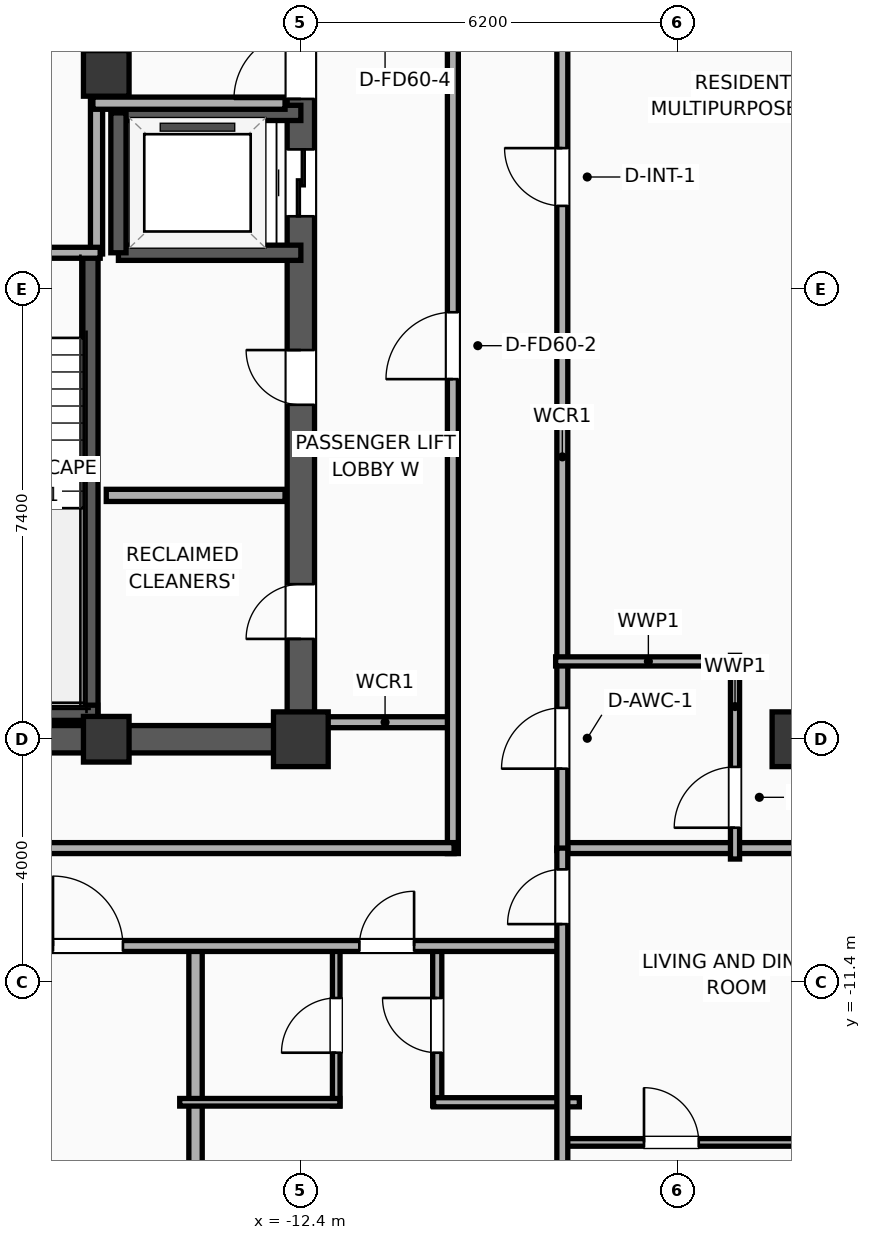
"""IFC4 building model, lengths in metres.
Left out: names, types, materials, properties, quantities, classifications, styles, units other than length and angle.
Written with IfcOpenShell. Run it as: python <this file> out.ifc"""

import sys

from ifc_helpers import new_model, si_unit, direction, frame, frame_2d, origin, origin_2d, place, context, subcontext, project, spatial, rectangle, extrude, element, fill, save


model = new_model("IFC4")
c1 = context("Model", 3, precision=1e-05, world=origin(), true_north=direction((0.0, 1.0)))
c2 = subcontext(c1, "Body", "Model", "MODEL_VIEW")
j1 = project(units=[si_unit("LENGTHUNIT", "METRE"), si_unit("PLANEANGLEUNIT", "RADIAN")], contexts=[c1])
p1 = place(None, origin())
s1 = spatial("IfcSite", under=j1, at=p1, CompositionType="ELEMENT")
p2 = place(p1, origin())
s2 = spatial("IfcBuilding", under=s1, at=p2, CompositionType="ELEMENT")
p3 = place(p2, frame((0.0, 0.0, 215.8)))
s3 = spatial("IfcBuildingStorey", under=s2, at=p3, CompositionType="ELEMENT", Elevation=215.8)
p4 = place(p3, frame((-15.6, -7.4, 0.0), z_axis=(0.0, 0.0, 1.0), x_axis=(1.0, 0.0, 0.0)))
e1 = element("IfcColumn", 1, at=p4, inside=s3, PredefinedType="COLUMN", context=c2, shape_type="SweptSolid", body=[
    extrude(rectangle(XDim=0.75, YDim=0.75, at=origin_2d()), origin(), (0.0, 0.0, 1.0), 3.9),
])
p5 = place(p3, frame((-12.4, -7.4, 0.0), z_axis=(0.0, 0.0, 1.0), x_axis=(1.0, 0.0, 0.0)))
e2 = element("IfcColumn", 2, at=p5, inside=s3, PredefinedType="COLUMN", context=c2, shape_type="SweptSolid", body=[
    extrude(rectangle(XDim=0.9, YDim=0.9, at=origin_2d()), origin(), (0.0, 0.0, 1.0), 3.9),
])
p6 = place(p3, frame((-15.6, 3.55, 0.0), z_axis=(0.0, 0.0, 1.0), x_axis=(1.0, 0.0, 0.0)))
e3 = element("IfcColumn", 3, at=p6, inside=s3, PredefinedType="COLUMN", context=c2, shape_type="SweptSolid", body=[
    extrude(rectangle(XDim=0.75, YDim=0.75, at=origin_2d()), origin(), (0.0, 0.0, 1.0), 3.9),
])
p7 = place(p3, frame((-19.425, -7.4, 0.0), z_axis=(0.0, 0.0, 1.0), x_axis=(1.0, 0.0, 0.0)))
e4 = element("IfcWall", 4, at=p7, inside=s3, PredefinedType="SHEAR", context=c2, shape_type="SweptSolid", body=[
    extrude(rectangle(XDim=7.25, YDim=0.45, at=frame_2d((3.625, 0.0))), origin(), (0.0, 0.0, 1.0), 3.65),
])
p8 = place(p3, frame((-12.4, -7.4, 0.0), z_axis=(0.0, 0.0, 1.0), x_axis=(0.0, 1.0, 0.0)))
e5 = element("IfcWall", 5, at=p8, inside=s3, PredefinedType="SHEAR", context=c2, shape_type="SweptSolid", body=[
    extrude(rectangle(XDim=14.8, YDim=0.45, at=frame_2d((7.4, 0.0))), origin(), (0.0, 0.0, 1.0), 3.65),
])
p9 = place(p8, frame((8.6, 0.0, 0.0)))
e6 = element("IfcOpeningElement", 6, at=p9, cuts=e5, PredefinedType="OPENING", context=c2, shape_type="SweptSolid", body=[
    extrude(rectangle(XDim=1.1, YDim=2.05, at=frame_2d((0.55, 1.025))), frame((0.0, 0.235, 0.0), z_axis=(0.0, -1.0, 0.0), x_axis=(1.0, 0.0, 0.0)), (0.0, 0.0, 1.0), 0.47),
])
p10 = place(p8, frame((10.53, 0.0, 0.0)))
e7 = element("IfcOpeningElement", 7, at=p10, cuts=e5, PredefinedType="OPENING", context=c2, shape_type="SweptSolid", body=[
    extrude(rectangle(XDim=1.1, YDim=2.05, at=frame_2d((0.55, 1.025))), frame((0.0, 0.235, 0.0), z_axis=(0.0, -1.0, 0.0), x_axis=(1.0, 0.0, 0.0)), (0.0, 0.0, 1.0), 0.47),
])
p11 = place(p8, frame((1.65, 0.0, 0.0)))
e8 = element("IfcOpeningElement", 8, at=p11, cuts=e5, PredefinedType="OPENING", context=c2, shape_type="SweptSolid", body=[
    extrude(rectangle(XDim=0.9, YDim=2.05, at=frame_2d((0.45, 1.025))), frame((0.0, 0.235, 0.0), z_axis=(0.0, -1.0, 0.0), x_axis=(1.0, 0.0, 0.0)), (0.0, 0.0, 1.0), 0.47),
])
p12 = place(p8, frame((5.5, 0.0, 0.0)))
e9 = element("IfcOpeningElement", 9, at=p12, cuts=e5, PredefinedType="OPENING", context=c2, shape_type="SweptSolid", body=[
    extrude(rectangle(XDim=0.9, YDim=2.05, at=frame_2d((0.45, 1.025))), frame((0.0, 0.235, 0.0), z_axis=(0.0, -1.0, 0.0), x_axis=(1.0, 0.0, 0.0)), (0.0, 0.0, 1.0), 0.47),
])
p13 = place(p3, frame((-15.86, -7.085, 0.0), z_axis=(0.0, 0.0, 1.0), x_axis=(0.0, 1.0, 0.0)))
e10 = element("IfcWall", 10, at=p13, inside=s3, PredefinedType="SOLIDWALL", context=c2, shape_type="SweptSolid", body=[
    extrude(rectangle(XDim=7.685, YDim=0.25, at=frame_2d((3.843, 0.0))), origin(), (0.0, 0.0, 1.0), 3.65),
])
p14 = place(p3, frame((-19.2, -6.965, 0.0), z_axis=(0.0, 0.0, 1.0), x_axis=(1.0, 0.0, 0.0)))
e11 = element("IfcWall", 11, at=p14, inside=s3, PredefinedType="SOLIDWALL", context=c2, shape_type="SweptSolid", body=[
    extrude(rectangle(XDim=3.46, YDim=0.25, at=frame_2d((1.73, 0.0))), origin(), (0.0, 0.0, 1.0), 3.65),
])
p15 = place(p3, frame((-4.2, -7.4, 0.0), z_axis=(0.0, 0.0, 1.0), x_axis=(1.0, 0.0, 0.0)))
e12 = element("IfcColumn", 12, at=p15, inside=s3, PredefinedType="COLUMN", context=c2, shape_type="SweptSolid", body=[
    extrude(rectangle(XDim=0.9, YDim=0.9, at=origin_2d()), origin(), (0.0, 0.0, 1.0), 3.9),
])
for number, where, z_axis, x_axis in (
    (13, (-15.4, 0.6, 0.0), (0.0, 0.0, 1.0), (1.0, 0.0, 0.0)),
    (14, (-12.4, 2.9, 0.0), (0.0, 0.0, 1.0), (-1.0, 0.0, 0.0)),
):
    element("IfcWall", number, at=place(p3, frame(where, z_axis=z_axis, x_axis=x_axis)), inside=s3, PredefinedType="SOLIDWALL", context=c2, shape_type="SweptSolid", body=[
        extrude(rectangle(XDim=3.0, YDim=0.25, at=frame_2d((1.5, 0.0))), origin(), (0.0, 0.0, 1.0), 3.65),
    ])
p16 = place(p3, frame((-15.4, 2.9, 0.0), z_axis=(0.0, 0.0, 1.0), x_axis=(0.0, -1.0, 0.0)))
e15 = element("IfcWall", 15, at=p16, inside=s3, PredefinedType="SOLIDWALL", context=c2, shape_type="SweptSolid", body=[
    extrude(rectangle(XDim=2.3, YDim=0.25, at=frame_2d((1.15, 0.0))), origin(), (0.0, 0.0, 1.0), 3.65),
])
p17 = place(p3, frame((-15.76, 0.58, 0.0), z_axis=(0.0, 0.0, 1.0), x_axis=(0.0, 1.0, 0.0)))
e16 = element("IfcWall", 16, at=p17, inside=s3, PredefinedType="PARTITIONING", context=c2, shape_type="SweptSolid", body=[
    extrude(rectangle(XDim=2.52, YDim=0.2, at=frame_2d((1.26, 0.0))), origin(), (0.0, 0.0, 1.0), 3.65),
])
p18 = place(p3, frame((-15.82, 3.06, 0.0), z_axis=(0.0, 0.0, 1.0), x_axis=(1.0, 0.0, 0.0)))
e17 = element("IfcWall", 17, at=p18, inside=s3, PredefinedType="PARTITIONING", context=c2, shape_type="SweptSolid", body=[
    extrude(rectangle(XDim=3.16, YDim=0.2, at=frame_2d((1.58, 0.0))), origin(), (0.0, 0.0, 1.0), 3.65),
])
p19 = place(p3, frame((-19.06, 0.6, 0.0), z_axis=(0.0, 0.0, 1.0), x_axis=(1.0, 0.0, 0.0)))
e18 = element("IfcWall", 18, at=p19, inside=s3, PredefinedType="PARTITIONING", context=c2, shape_type="SweptSolid", body=[
    extrude(rectangle(XDim=3.36, YDim=0.18, at=frame_2d((1.68, 0.0))), origin(), (0.0, 0.0, 1.0), 3.65),
])
p20 = place(p19, frame((1.155, 0.0, 0.0)))
e19 = element("IfcOpeningElement", 19, at=p20, cuts=e18, PredefinedType="OPENING", context=c2, shape_type="SweptSolid", body=[
    extrude(rectangle(XDim=1.05, YDim=2.05, at=frame_2d((0.525, 1.025))), frame((0.0, 0.1, 0.0), z_axis=(0.0, -1.0, 0.0), x_axis=(1.0, 0.0, 0.0)), (0.0, 0.0, 1.0), 0.2),
])
p21 = place(p3, frame((-15.6, -3.39, 0.0), z_axis=(0.0, 0.0, 1.0), x_axis=(1.0, 0.0, 0.0)))
e20 = element("IfcWall", 20, at=p21, inside=s3, PredefinedType="PARTITIONING", context=c2, shape_type="SweptSolid", body=[
    extrude(rectangle(XDim=2.94, YDim=0.2, at=frame_2d((1.47, 0.0))), origin(), (0.0, 0.0, 1.0), 3.65),
])
p22 = place(p3, frame((-12.15, -7.12, 0.0), z_axis=(0.0, 0.0, 1.0), x_axis=(1.0, 0.0, 0.0)))
e21 = element("IfcWall", 21, at=p22, inside=s3, PredefinedType="PARTITIONING", context=c2, shape_type="SweptSolid", body=[
    extrude(rectangle(XDim=2.27, YDim=0.18, at=frame_2d((1.135, 0.0))), origin(), (0.0, 0.0, 1.0), 3.65),
])
p23 = place(p3, frame((-9.9, -9.28, 0.0), z_axis=(0.0, 0.0, 1.0), x_axis=(0.0, 1.0, 0.0)))
e22 = element("IfcWall", 22, at=p23, inside=s3, PredefinedType="PARTITIONING", context=c2, shape_type="SweptSolid", body=[
    extrude(rectangle(XDim=18.56, YDim=0.18, at=frame_2d((9.28, 0.0))), origin(), (0.0, 0.0, 1.0), 3.65),
])
p24 = place(p23, frame((7.802, 0.0, 0.0)))
e23 = element("IfcOpeningElement", 23, at=p24, cuts=e22, PredefinedType="OPENING", context=c2, shape_type="SweptSolid", body=[
    extrude(rectangle(XDim=1.1, YDim=2.05, at=frame_2d((0.55, 1.025))), frame((0.0, 0.1, 0.0), z_axis=(0.0, -1.0, 0.0), x_axis=(1.0, 0.0, 0.0)), (0.0, 0.0, 1.0), 0.2),
])
p25 = place(p3, frame((-26.23, -9.19, 0.0), z_axis=(0.0, 0.0, 1.0), x_axis=(1.0, 0.0, 0.0)))
e24 = element("IfcWall", 24, at=p25, inside=s3, PredefinedType="PARTITIONING", context=c2, shape_type="SweptSolid", body=[
    extrude(rectangle(XDim=16.35, YDim=0.18, at=frame_2d((8.175, 0.0))), origin(), (0.0, 0.0, 1.0), 3.65),
])
p26 = place(p3, frame((-8.15, -9.19, 0.0), z_axis=(0.0, 0.0, 1.0), x_axis=(1.0, 0.0, 0.0)))
e25 = element("IfcWall", 25, at=p26, inside=s3, PredefinedType="PARTITIONING", context=c2, shape_type="SweptSolid", body=[
    extrude(rectangle(XDim=16.3, YDim=0.18, at=frame_2d((8.15, 0.0))), origin(), (0.0, 0.0, 1.0), 3.65),
])
p27 = place(p3, frame((-8.1, -9.23, 0.0), z_axis=(0.0, 0.0, 1.0), x_axis=(0.0, 1.0, 0.0)))
e26 = element("IfcWall", 26, at=p27, inside=s3, PredefinedType="PARTITIONING", context=c2, shape_type="SweptSolid", body=[
    extrude(rectangle(XDim=18.46, YDim=0.18, at=frame_2d((9.23, 0.0))), origin(), (0.0, 0.0, 1.0), 3.65),
])
p28 = place(p27, frame((1.346, 0.0, 0.0)))
e27 = element("IfcOpeningElement", 27, at=p28, cuts=e26, PredefinedType="OPENING", context=c2, shape_type="SweptSolid", body=[
    extrude(rectangle(XDim=1.0, YDim=2.05, at=frame_2d((0.5, 1.025))), frame((0.0, 0.1, 0.0), z_axis=(0.0, -1.0, 0.0), x_axis=(1.0, 0.0, 0.0)), (0.0, 0.0, 1.0), 0.2),
])
p29 = place(p27, frame((10.601, 0.0, 0.0)))
e28 = element("IfcOpeningElement", 28, at=p29, cuts=e26, PredefinedType="OPENING", context=c2, shape_type="SweptSolid", body=[
    extrude(rectangle(XDim=0.95, YDim=2.05, at=frame_2d((0.475, 1.025))), frame((0.0, 0.1, 0.0), z_axis=(0.0, -1.0, 0.0), x_axis=(1.0, 0.0, 0.0)), (0.0, 0.0, 1.0), 0.2),
])
p30 = place(p3, frame((-5.26, -9.37, 0.0), z_axis=(0.0, 0.0, 1.0), x_axis=(0.0, 1.0, 0.0)))
e29 = element("IfcWall", 29, at=p30, inside=s3, PredefinedType="PLUMBINGWALL", context=c2, shape_type="SweptSolid", body=[
    extrude(rectangle(XDim=3.35, YDim=0.15, at=frame_2d((1.675, 0.0))), origin(), (0.0, 0.0, 1.0), 3.65),
])
p31 = place(p30, frame((0.515, 0.0, 0.0)))
e30 = element("IfcOpeningElement", 30, at=p31, cuts=e29, PredefinedType="OPENING", context=c2, shape_type="SweptSolid", body=[
    extrude(rectangle(XDim=1.0, YDim=2.05, at=frame_2d((0.5, 1.025))), frame((0.0, 0.085, 0.0), z_axis=(0.0, -1.0, 0.0), x_axis=(1.0, 0.0, 0.0)), (0.0, 0.0, 1.0), 0.17),
])
p32 = place(p3, frame((-8.21, -6.12, 0.0), z_axis=(0.0, 0.0, 1.0), x_axis=(1.0, 0.0, 0.0)))
e31 = element("IfcWall", 31, at=p32, inside=s3, PredefinedType="PLUMBINGWALL", context=c2, shape_type="SweptSolid", body=[
    extrude(rectangle(XDim=3.05, YDim=0.15, at=frame_2d((1.525, 0.0))), origin(), (0.0, 0.0, 1.0), 3.65),
])
p33 = place(p3, frame((-14.132, -18.83, 0.0), z_axis=(0.0, 0.0, 1.0), x_axis=(0.0, 1.0, 0.0)))
e32 = element("IfcWall", 32, at=p33, inside=s3, PredefinedType="PARTITIONING", context=c2, shape_type="SweptSolid", body=[
    extrude(rectangle(XDim=8.11, YDim=0.22, at=frame_2d((4.055, 0.0))), origin(), (0.0, 0.0, 1.0), 3.65),
])
p34 = place(p3, frame((-11.818, -13.43, 0.0), z_axis=(0.0, 0.0, 1.0), x_axis=(0.0, 1.0, 0.0)))
e33 = element("IfcWall", 33, at=p34, inside=s3, PredefinedType="PARTITIONING", context=c2, shape_type="SweptSolid", body=[
    extrude(rectangle(XDim=2.65, YDim=0.125, at=frame_2d((1.325, 0.0))), origin(), (0.0, 0.0, 1.0), 3.65),
])
p35 = place(p34, frame((0.875, 0.0, 0.0)))
e34 = element("IfcOpeningElement", 34, at=p35, cuts=e33, PredefinedType="OPENING", context=c2, shape_type="SweptSolid", body=[
    extrude(rectangle(XDim=0.9, YDim=2.05, at=frame_2d((0.45, 1.025))), frame((0.0, 0.073, 0.0), z_axis=(0.0, -1.0, 0.0), x_axis=(1.0, 0.0, 0.0)), (0.0, 0.0, 1.0), 0.145),
])
p36 = place(p3, frame((-10.157, -13.43, 0.0), z_axis=(0.0, 0.0, 1.0), x_axis=(0.0, 1.0, 0.0)))
e35 = element("IfcWall", 35, at=p36, inside=s3, PredefinedType="PLUMBINGWALL", context=c2, shape_type="SweptSolid", body=[
    extrude(rectangle(XDim=2.65, YDim=0.15, at=frame_2d((1.325, 0.0))), origin(), (0.0, 0.0, 1.0), 3.65),
])
p37 = place(p36, frame((0.875, 0.0, 0.0)))
e36 = element("IfcOpeningElement", 36, at=p37, cuts=e35, PredefinedType="OPENING", context=c2, shape_type="SweptSolid", body=[
    extrude(rectangle(XDim=0.9, YDim=2.05, at=frame_2d((0.45, 1.025))), frame((0.0, 0.085, 0.0), z_axis=(0.0, -1.0, 0.0), x_axis=(1.0, 0.0, 0.0)), (0.0, 0.0, 1.0), 0.17),
])
p38 = place(p3, frame((-14.392, -13.37, 0.0), z_axis=(0.0, 0.0, 1.0), x_axis=(1.0, 0.0, 0.0)))
e37 = element("IfcWall", 37, at=p38, inside=s3, PredefinedType="PARTITIONING", context=c2, shape_type="SweptSolid", body=[
    extrude(rectangle(XDim=2.634, YDim=0.125, at=frame_2d((1.317, 0.0))), origin(), (0.0, 0.0, 1.0), 3.65),
])
p39 = place(p3, frame((-10.217, -13.37, 0.0), z_axis=(0.0, 0.0, 1.0), x_axis=(1.0, 0.0, 0.0)))
e38 = element("IfcWall", 38, at=p39, inside=s3, PredefinedType="PLUMBINGWALL", context=c2, shape_type="SweptSolid", body=[
    extrude(rectangle(XDim=2.397, YDim=0.15, at=frame_2d((1.198, 0.0))), origin(), (0.0, 0.0, 1.0), 3.65),
])
p40 = place(p3, frame((-26.23, -10.8, 0.0), z_axis=(0.0, 0.0, 1.0), x_axis=(1.0, 0.0, 0.0)))
e39 = element("IfcWall", 39, at=p40, inside=s3, PredefinedType="PARTITIONING", context=c2, shape_type="SweptSolid", body=[
    extrude(rectangle(XDim=18.15, YDim=0.18, at=frame_2d((9.075, 0.0))), origin(), (0.0, 0.0, 1.0), 3.65),
])
p41 = place(p40, frame((2.659, 0.0, 0.0)))
e40 = element("IfcOpeningElement", 40, at=p41, cuts=e39, PredefinedType="OPENING", context=c2, shape_type="SweptSolid", body=[
    extrude(rectangle(XDim=0.9, YDim=2.05, at=frame_2d((0.45, 1.025))), frame((0.0, 0.1, 0.0), z_axis=(0.0, -1.0, 0.0), x_axis=(1.0, 0.0, 0.0)), (0.0, 0.0, 1.0), 0.2),
])
p42 = place(p40, frame((9.754, 0.0, 0.0)))
e41 = element("IfcOpeningElement", 41, at=p42, cuts=e39, PredefinedType="OPENING", context=c2, shape_type="SweptSolid", body=[
    extrude(rectangle(XDim=1.15, YDim=2.05, at=frame_2d((0.575, 1.025))), frame((0.0, 0.1, 0.0), z_axis=(0.0, -1.0, 0.0), x_axis=(1.0, 0.0, 0.0)), (0.0, 0.0, 1.0), 0.2),
])
p43 = place(p40, frame((14.792, 0.0, 0.0)))
e42 = element("IfcOpeningElement", 42, at=p43, cuts=e39, PredefinedType="OPENING", context=c2, shape_type="SweptSolid", body=[
    extrude(rectangle(XDim=0.9, YDim=2.05, at=frame_2d((0.45, 1.025))), frame((0.0, 0.1, 0.0), z_axis=(0.0, -1.0, 0.0), x_axis=(1.0, 0.0, 0.0)), (0.0, 0.0, 1.0), 0.2),
])
p44 = place(p3, frame((-8.08, -14.03, 0.0), z_axis=(0.0, 0.0, 1.0), x_axis=(1.0, 0.0, 0.0)))
e43 = element("IfcWall", 43, at=p44, inside=s3, PredefinedType="PARTITIONING", context=c2, shape_type="SweptSolid", body=[
    extrude(rectangle(XDim=8.06, YDim=0.125, at=frame_2d((4.03, 0.0))), origin(), (0.0, 0.0, 1.0), 3.65),
])
p45 = place(p44, frame((1.323, 0.0, 0.0)))
e44 = element("IfcOpeningElement", 44, at=p45, cuts=e43, PredefinedType="OPENING", context=c2, shape_type="SweptSolid", body=[
    extrude(rectangle(XDim=0.9, YDim=2.05, at=frame_2d((0.45, 1.025))), frame((0.0, 0.073, 0.0), z_axis=(0.0, -1.0, 0.0), x_axis=(1.0, 0.0, 0.0)), (0.0, 0.0, 1.0), 0.145),
])
p46 = place(p44, frame((4.547, 0.0, 0.0)))
e45 = element("IfcOpeningElement", 45, at=p46, cuts=e43, PredefinedType="OPENING", context=c2, shape_type="SweptSolid", body=[
    extrude(rectangle(XDim=0.9, YDim=2.05, at=frame_2d((0.45, 1.025))), frame((0.0, 0.073, 0.0), z_axis=(0.0, -1.0, 0.0), x_axis=(1.0, 0.0, 0.0)), (0.0, 0.0, 1.0), 0.145),
])
p47 = place(p3, frame((-8.1, -18.83, 0.0), z_axis=(0.0, 0.0, 1.0), x_axis=(0.0, 1.0, 0.0)))
e46 = element("IfcWall", 46, at=p47, inside=s3, PredefinedType="PARTITIONING", context=c2, shape_type="SweptSolid", body=[
    extrude(rectangle(XDim=9.64, YDim=0.18, at=frame_2d((4.82, 0.0))), origin(), (0.0, 0.0, 1.0), 3.65),
])
p48 = place(p47, frame((8.39, 0.0, 0.0)))
e47 = element("IfcOpeningElement", 47, at=p48, cuts=e46, PredefinedType="OPENING", context=c2, shape_type="SweptSolid", body=[
    extrude(rectangle(XDim=0.9, YDim=2.05, at=frame_2d((0.45, 1.025))), frame((0.0, 0.1, 0.0), z_axis=(0.0, -1.0, 0.0), x_axis=(1.0, 0.0, 0.0)), (0.0, 0.0, 1.0), 0.2),
])
p49 = place(p9, origin())
e48 = element("IfcDoor", 48, at=p49, inside=s3, OperationType="SLIDING_TO_LEFT", PredefinedType="DOOR", context=c2, shape_type="SweptSolid", body=[
    extrude(rectangle(XDim=1.1, YDim=2.05, at=frame_2d((0.55, 1.025))), frame((0.0, 0.025, 0.0), z_axis=(0.0, -1.0, 0.0), x_axis=(1.0, 0.0, 0.0)), (0.0, 0.0, 1.0), 0.05),
])
fill(e6, e48)
p50 = place(p24, origin())
e49 = element("IfcDoor", 49, at=p50, inside=s3, OperationType="SINGLE_SWING_LEFT", PredefinedType="DOOR", context=c2, shape_type="SweptSolid", body=[
    extrude(rectangle(XDim=1.1, YDim=2.05, at=frame_2d((0.55, 1.025))), frame((0.0, 0.025, 0.0), z_axis=(0.0, -1.0, 0.0), x_axis=(1.0, 0.0, 0.0)), (0.0, 0.0, 1.0), 0.05),
])
fill(e23, e49)
p51 = place(p28, origin())
e50 = element("IfcDoor", 50, at=p51, inside=s3, OperationType="SINGLE_SWING_LEFT", PredefinedType="DOOR", context=c2, shape_type="SweptSolid", body=[
    extrude(rectangle(XDim=1.0, YDim=2.05, at=frame_2d((0.5, 1.025))), frame((0.0, 0.025, 0.0), z_axis=(0.0, -1.0, 0.0), x_axis=(1.0, 0.0, 0.0)), (0.0, 0.0, 1.0), 0.05),
])
fill(e27, e50)
p52 = place(p29, origin())
e51 = element("IfcDoor", 51, at=p52, inside=s3, OperationType="SINGLE_SWING_RIGHT", PredefinedType="DOOR", context=c2, shape_type="SweptSolid", body=[
    extrude(rectangle(XDim=0.95, YDim=2.05, at=frame_2d((0.475, 1.025))), frame((0.0, 0.025, 0.0), z_axis=(0.0, -1.0, 0.0), x_axis=(1.0, 0.0, 0.0)), (0.0, 0.0, 1.0), 0.05),
])
fill(e28, e51)
p53 = place(p31, origin())
e52 = element("IfcDoor", 52, at=p53, inside=s3, OperationType="SINGLE_SWING_LEFT", PredefinedType="DOOR", context=c2, shape_type="SweptSolid", body=[
    extrude(rectangle(XDim=1.0, YDim=2.05, at=frame_2d((0.5, 1.025))), frame((0.0, 0.025, 0.0), z_axis=(0.0, -1.0, 0.0), x_axis=(1.0, 0.0, 0.0)), (0.0, 0.0, 1.0), 0.05),
])
fill(e30, e52)
p54 = place(p35, origin())
e53 = element("IfcDoor", 53, at=p54, inside=s3, OperationType="SINGLE_SWING_LEFT", PredefinedType="DOOR", context=c2, shape_type="SweptSolid", body=[
    extrude(rectangle(XDim=0.9, YDim=2.05, at=frame_2d((0.45, 1.025))), frame((0.0, 0.025, 0.0), z_axis=(0.0, -1.0, 0.0), x_axis=(1.0, 0.0, 0.0)), (0.0, 0.0, 1.0), 0.05),
])
fill(e34, e53)
p55 = place(p37, origin())
e54 = element("IfcDoor", 54, at=p55, inside=s3, OperationType="SINGLE_SWING_RIGHT", PredefinedType="DOOR", context=c2, shape_type="SweptSolid", body=[
    extrude(rectangle(XDim=0.9, YDim=2.05, at=frame_2d((0.45, 1.025))), frame((0.0, 0.025, 0.0), z_axis=(0.0, -1.0, 0.0), x_axis=(1.0, 0.0, 0.0)), (0.0, 0.0, 1.0), 0.05),
])
fill(e36, e54)
p56 = place(p42, origin())
e55 = element("IfcDoor", 55, at=p56, inside=s3, OperationType="SINGLE_SWING_LEFT", PredefinedType="DOOR", context=c2, shape_type="SweptSolid", body=[
    extrude(rectangle(XDim=1.15, YDim=2.05, at=frame_2d((0.575, 1.025))), frame((0.0, 0.025, 0.0), z_axis=(0.0, -1.0, 0.0), x_axis=(1.0, 0.0, 0.0)), (0.0, 0.0, 1.0), 0.05),
])
fill(e41, e55)
p57 = place(p43, origin())
e56 = element("IfcDoor", 56, at=p57, inside=s3, OperationType="SINGLE_SWING_RIGHT", PredefinedType="DOOR", context=c2, shape_type="SweptSolid", body=[
    extrude(rectangle(XDim=0.9, YDim=2.05, at=frame_2d((0.45, 1.025))), frame((0.0, 0.025, 0.0), z_axis=(0.0, -1.0, 0.0), x_axis=(1.0, 0.0, 0.0)), (0.0, 0.0, 1.0), 0.05),
])
fill(e42, e56)
p58 = place(p45, origin())
e57 = element("IfcDoor", 57, at=p58, inside=s3, OperationType="SINGLE_SWING_LEFT", PredefinedType="DOOR", context=c2, shape_type="SweptSolid", body=[
    extrude(rectangle(XDim=0.9, YDim=2.05, at=frame_2d((0.45, 1.025))), frame((0.0, 0.025, 0.0), z_axis=(0.0, -1.0, 0.0), x_axis=(1.0, 0.0, 0.0)), (0.0, 0.0, 1.0), 0.05),
])
fill(e44, e57)
p59 = place(p48, origin())
e58 = element("IfcDoor", 58, at=p59, inside=s3, OperationType="SINGLE_SWING_LEFT", PredefinedType="DOOR", context=c2, shape_type="SweptSolid", body=[
    extrude(rectangle(XDim=0.9, YDim=2.05, at=frame_2d((0.45, 1.025))), frame((0.0, 0.025, 0.0), z_axis=(0.0, -1.0, 0.0), x_axis=(1.0, 0.0, 0.0)), (0.0, 0.0, 1.0), 0.05),
])
fill(e47, e58)
p60 = place(p10, origin())
e59 = element("IfcDoor", 59, at=p60, inside=s3, OperationType="SINGLE_SWING_LEFT", PredefinedType="DOOR", context=c2, shape_type="SweptSolid", body=[
    extrude(rectangle(XDim=1.1, YDim=2.05, at=frame_2d((0.55, 1.025))), frame((0.0, 0.025, 0.0), z_axis=(0.0, -1.0, 0.0), x_axis=(1.0, 0.0, 0.0)), (0.0, 0.0, 1.0), 0.05),
])
fill(e7, e59)
p61 = place(p11, origin())
e60 = element("IfcDoor", 60, at=p61, inside=s3, OperationType="SINGLE_SWING_LEFT", PredefinedType="DOOR", context=c2, shape_type="SweptSolid", body=[
    extrude(rectangle(XDim=0.9, YDim=2.05, at=frame_2d((0.45, 1.025))), frame((0.0, 0.025, 0.0), z_axis=(0.0, -1.0, 0.0), x_axis=(1.0, 0.0, 0.0)), (0.0, 0.0, 1.0), 0.05),
])
fill(e8, e60)
p62 = place(p12, origin())
e61 = element("IfcDoor", 61, at=p62, inside=s3, OperationType="SINGLE_SWING_RIGHT", PredefinedType="DOOR", context=c2, shape_type="SweptSolid", body=[
    extrude(rectangle(XDim=0.9, YDim=2.05, at=frame_2d((0.45, 1.025))), frame((0.0, 0.025, 0.0), z_axis=(0.0, -1.0, 0.0), x_axis=(1.0, 0.0, 0.0)), (0.0, 0.0, 1.0), 0.05),
])
fill(e9, e61)
save(model, sys.argv[1])
